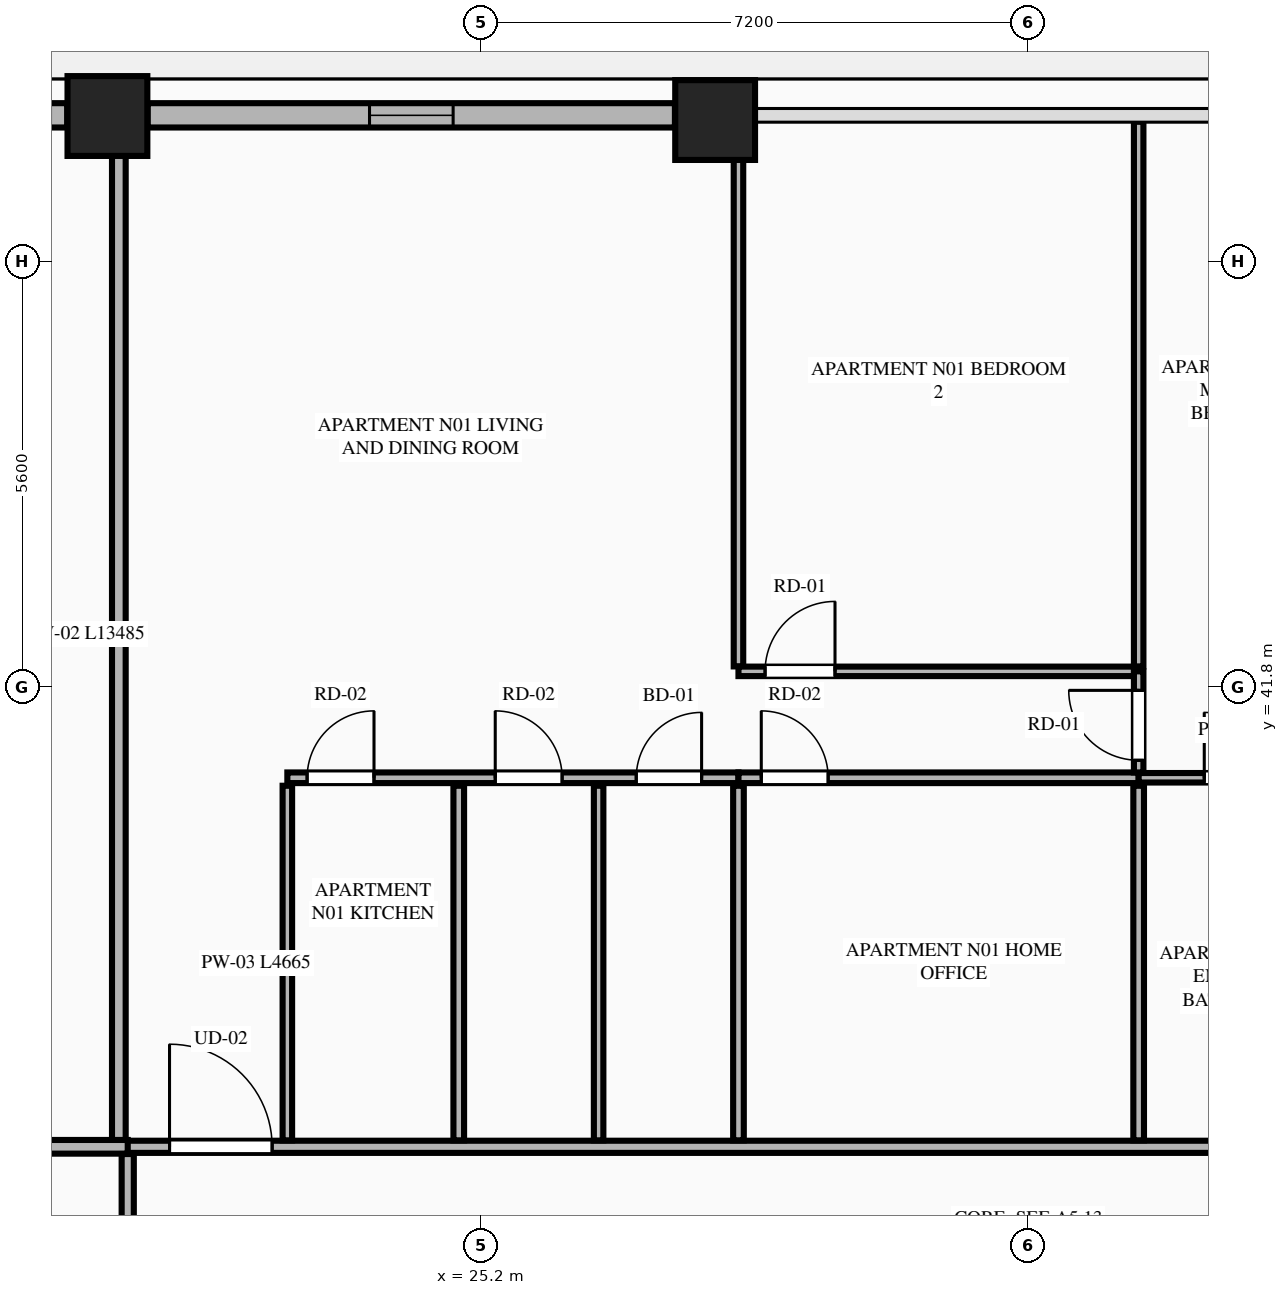
"""IFC4 building model, lengths in metres.
Left out: names, types, materials, properties, quantities, classifications, styles, units other than length and angle.
Written with IfcOpenShell. Run it as: python <this file> out.ifc"""

import sys

from ifc_helpers import new_model, si_unit, direction, frame, frame_2d, origin, origin_2d, place, context, subcontext, project, spatial, rectangle, extrude, element, fill, save


model = new_model("IFC4")
c1 = context("Model", 3, precision=1e-05, world=origin(), true_north=direction((0.0, 1.0)))
c2 = subcontext(c1, "Body", "Model", "MODEL_VIEW")
j1 = project(units=[si_unit("LENGTHUNIT", "METRE"), si_unit("PLANEANGLEUNIT", "RADIAN")], contexts=[c1])
p1 = place(None, origin())
s1 = spatial("IfcSite", under=j1, at=p1, CompositionType="ELEMENT")
p2 = place(p1, origin())
s2 = spatial("IfcBuilding", under=s1, at=p2, CompositionType="ELEMENT")
p3 = place(p2, frame((0.0, 0.0, 94.2)))
s3 = spatial("IfcBuildingStorey", under=s2, at=p3, CompositionType="ELEMENT", Elevation=94.2)
for number, where, z_axis, x_axis in (
    (1, (28.278, 49.258, 0.0), (0.0, 0.0, 1.0), (1.0, 0.0, 0.0)),
    (2, (20.283, 49.311, 0.0), (0.0, 0.0, 1.0), (1.0, 0.0, 0.0)),
):
    element("IfcColumn", number, at=place(p3, frame(where, z_axis=z_axis, x_axis=x_axis)), inside=s3, PredefinedType="COLUMN", context=c2, shape_type="SweptSolid", body=[
        extrude(rectangle(XDim=1.05, YDim=1.05, at=origin_2d()), origin(), (0.0, 0.0, 1.0), 4.2),
    ])
p4 = place(p3, frame((27.749, 49.32, 0.0), z_axis=(0.0, 0.0, 1.0), x_axis=(-1.0, 0.0, 0.0)))
e3 = element("IfcWall", 3, at=p4, inside=s3, PredefinedType="STANDARD", context=c2, shape_type="SweptSolid", body=[
    extrude(rectangle(XDim=6.937, YDim=0.32, at=frame_2d((3.469, 0.0))), origin(), (0.0, 0.0, 1.0), 2.59),
])
p5 = place(p4, frame((2.918, 0.0, 0.75)))
e4 = element("IfcOpeningElement", 4, at=p5, cuts=e3, PredefinedType="OPENING", context=c2, shape_type="SweptSolid", body=[
    extrude(rectangle(XDim=1.1, YDim=1.69, at=frame_2d((0.55, 0.845))), frame((0.0, 0.17, 0.0), z_axis=(0.0, -1.0, 0.0), x_axis=(1.0, 0.0, 0.0)), (0.0, 0.0, 1.0), 0.34),
])
p6 = place(p3, frame((19.754, 49.32, 0.0), z_axis=(0.0, 0.0, 1.0), x_axis=(-1.0, 0.0, 0.0)))
e5 = element("IfcWall", 5, at=p6, inside=s3, PredefinedType="STANDARD", context=c2, shape_type="SweptSolid", body=[
    extrude(rectangle(XDim=1.318, YDim=0.32, at=frame_2d((0.659, 0.0))), origin(), (0.0, 0.0, 1.0), 3.99),
])
p7 = place(p6, frame((0.22, 0.0, 0.75)))
e6 = element("IfcOpeningElement", 6, at=p7, cuts=e5, PredefinedType="OPENING", context=c2, shape_type="SweptSolid", body=[
    extrude(rectangle(XDim=0.878, YDim=1.7, at=frame_2d((0.439, 0.85))), frame((0.0, 0.17, 0.0), z_axis=(0.0, -1.0, 0.0), x_axis=(1.0, 0.0, 0.0)), (0.0, 0.0, 1.0), 0.34),
])
p8 = place(p3, frame((20.433, 35.75, 0.0), z_axis=(0.0, 0.0, 1.0), x_axis=(0.0, 1.0, 0.0)))
e7 = element("IfcWall", 7, at=p8, inside=s3, PredefinedType="PARTITIONING", context=c2, shape_type="SweptSolid", body=[
    extrude(rectangle(XDim=13.485, YDim=0.18, at=frame_2d((6.743, 0.0))), origin(), (0.0, 0.0, 1.0), 2.59),
])
p9 = place(p3, frame((20.528, 35.75, 0.0), z_axis=(0.0, 0.0, 1.0), x_axis=(1.0, 0.0, 0.0)))
e8 = element("IfcWall", 8, at=p9, inside=s3, PredefinedType="PARTITIONING", context=c2, shape_type="SweptSolid", body=[
    extrude(rectangle(XDim=15.899, YDim=0.16, at=frame_2d((7.949, 0.0))), origin(), (0.0, 0.0, 1.0), 3.99),
])
p10 = place(p9, frame((0.572, 0.0, 0.0)))
e9 = element("IfcOpeningElement", 9, at=p10, cuts=e8, PredefinedType="OPENING", context=c2, shape_type="SweptSolid", body=[
    extrude(rectangle(XDim=1.35, YDim=2.35, at=frame_2d((0.675, 1.175))), frame((0.0, 0.09, 0.0), z_axis=(0.0, -1.0, 0.0), x_axis=(1.0, 0.0, 0.0)), (0.0, 0.0, 1.0), 0.18),
])
p11 = place(p3, frame((22.65, 35.835, 0.0), z_axis=(0.0, 0.0, 1.0), x_axis=(0.0, 1.0, 0.0)))
e10 = element("IfcWall", 10, at=p11, inside=s3, PredefinedType="PARTITIONING", context=c2, shape_type="SweptSolid", body=[
    extrude(rectangle(XDim=4.665, YDim=0.125, at=frame_2d((2.333, 0.0))), origin(), (0.0, 0.0, 1.0), 2.59),
])
p12 = place(p3, frame((22.65, 40.605, 0.0), z_axis=(0.0, 0.0, 1.0), x_axis=(1.0, 0.0, 0.0)))
e11 = element("IfcWall", 11, at=p12, inside=s3, PredefinedType="PLUMBINGWALL", context=c2, shape_type="SweptSolid", body=[
    extrude(rectangle(XDim=5.935, YDim=0.14, at=frame_2d((2.968, 0.0))), origin(), (0.0, 0.0, 1.0), 3.99),
])
p13 = place(p12, frame((4.59, 0.0, 0.0)))
e12 = element("IfcOpeningElement", 12, at=p13, cuts=e11, PredefinedType="OPENING", context=c2, shape_type="SweptSolid", body=[
    extrude(rectangle(XDim=0.86, YDim=2.1, at=frame_2d((0.43, 1.05))), frame((0.0, 0.08, 0.0), z_axis=(0.0, -1.0, 0.0), x_axis=(1.0, 0.0, 0.0)), (0.0, 0.0, 1.0), 0.16),
])
p14 = place(p12, frame((0.26, 0.0, 0.0)))
e13 = element("IfcOpeningElement", 13, at=p14, cuts=e11, PredefinedType="OPENING", context=c2, shape_type="SweptSolid", body=[
    extrude(rectangle(XDim=0.88, YDim=2.15, at=frame_2d((0.44, 1.075))), frame((0.0, 0.08, 0.0), z_axis=(0.0, -1.0, 0.0), x_axis=(1.0, 0.0, 0.0)), (0.0, 0.0, 1.0), 0.16),
])
p15 = place(p12, frame((2.735, 0.0, 0.0)))
e14 = element("IfcOpeningElement", 14, at=p15, cuts=e11, PredefinedType="OPENING", context=c2, shape_type="SweptSolid", body=[
    extrude(rectangle(XDim=0.88, YDim=2.15, at=frame_2d((0.44, 1.075))), frame((0.0, 0.08, 0.0), z_axis=(0.0, -1.0, 0.0), x_axis=(1.0, 0.0, 0.0)), (0.0, 0.0, 1.0), 0.16),
])
p16 = place(p3, frame((28.585, 40.605, 0.0), z_axis=(0.0, 0.0, 1.0), x_axis=(1.0, 0.0, 0.0)))
e15 = element("IfcWall", 15, at=p16, inside=s3, PredefinedType="PLUMBINGWALL", context=c2, shape_type="SweptSolid", body=[
    extrude(rectangle(XDim=5.265, YDim=0.14, at=frame_2d((2.633, 0.0))), origin(), (0.0, 0.0, 1.0), 3.99),
])
p17 = place(p16, frame((0.3, 0.0, 0.0)))
e16 = element("IfcOpeningElement", 16, at=p17, cuts=e15, PredefinedType="OPENING", context=c2, shape_type="SweptSolid", body=[
    extrude(rectangle(XDim=0.88, YDim=2.15, at=frame_2d((0.44, 1.075))), frame((0.0, 0.08, 0.0), z_axis=(0.0, -1.0, 0.0), x_axis=(1.0, 0.0, 0.0)), (0.0, 0.0, 1.0), 0.16),
])
p18 = place(p3, frame((33.85, 40.605, 0.0), z_axis=(0.0, 0.0, 1.0), x_axis=(1.0, 0.0, 0.0)))
e17 = element("IfcWall", 17, at=p18, inside=s3, PredefinedType="PARTITIONING", context=c2, shape_type="SweptSolid", body=[
    extrude(rectangle(XDim=2.577, YDim=0.125, at=frame_2d((1.289, 0.0))), origin(), (0.0, 0.0, 1.0), 3.99),
])
p19 = place(p18, frame((0.863, 0.0, 0.0)))
e18 = element("IfcOpeningElement", 18, at=p19, cuts=e17, PredefinedType="OPENING", context=c2, shape_type="SweptSolid", body=[
    extrude(rectangle(XDim=0.86, YDim=2.1, at=frame_2d((0.43, 1.05))), frame((0.0, 0.073, 0.0), z_axis=(0.0, -1.0, 0.0), x_axis=(1.0, 0.0, 0.0)), (0.0, 0.0, 1.0), 0.145),
])
p20 = place(p3, frame((24.905, 35.835, 0.0), z_axis=(0.0, 0.0, 1.0), x_axis=(0.0, 1.0, 0.0)))
e19 = element("IfcWall", 19, at=p20, inside=s3, PredefinedType="PLUMBINGWALL", context=c2, shape_type="SweptSolid", body=[
    extrude(rectangle(XDim=4.665, YDim=0.14, at=frame_2d((2.333, 0.0))), origin(), (0.0, 0.0, 1.0), 3.99),
])
p21 = place(p3, frame((26.745, 35.835, 0.0), z_axis=(0.0, 0.0, 1.0), x_axis=(0.0, 1.0, 0.0)))
e20 = element("IfcWall", 20, at=p21, inside=s3, PredefinedType="PARTITIONING", context=c2, shape_type="SweptSolid", body=[
    extrude(rectangle(XDim=4.665, YDim=0.125, at=frame_2d((2.333, 0.0))), origin(), (0.0, 0.0, 1.0), 3.99),
])
p22 = place(p3, frame((28.585, 42.07, 0.0), z_axis=(0.0, 0.0, 1.0), x_axis=(0.0, 1.0, 0.0)))
e21 = element("IfcWall", 21, at=p22, inside=s3, PredefinedType="PARTITIONING", context=c2, shape_type="SweptSolid", body=[
    extrude(rectangle(XDim=7.165, YDim=0.125, at=frame_2d((3.583, 0.0))), origin(), (0.0, 0.0, 1.0), 2.59),
])
p23 = place(p3, frame((28.585, 42.005, 0.0), z_axis=(0.0, 0.0, 1.0), x_axis=(1.0, 0.0, 0.0)))
e22 = element("IfcWall", 22, at=p23, inside=s3, PredefinedType="PARTITIONING", context=c2, shape_type="SweptSolid", body=[
    extrude(rectangle(XDim=5.265, YDim=0.125, at=frame_2d((2.633, 0.0))), origin(), (0.0, 0.0, 1.0), 3.99),
])
p24 = place(p23, frame((0.35, 0.0, 0.0)))
e23 = element("IfcOpeningElement", 23, at=p24, cuts=e22, PredefinedType="OPENING", context=c2, shape_type="SweptSolid", body=[
    extrude(rectangle(XDim=0.92, YDim=2.15, at=frame_2d((0.46, 1.075))), frame((0.0, 0.073, 0.0), z_axis=(0.0, -1.0, 0.0), x_axis=(1.0, 0.0, 0.0)), (0.0, 0.0, 1.0), 0.145),
])
p25 = place(p3, frame((33.85, 40.675, 0.0), z_axis=(0.0, 0.0, 1.0), x_axis=(0.0, 1.0, 0.0)))
e24 = element("IfcWall", 24, at=p25, inside=s3, PredefinedType="PARTITIONING", context=c2, shape_type="SweptSolid", body=[
    extrude(rectangle(XDim=1.33, YDim=0.125, at=frame_2d((0.665, 0.0))), origin(), (0.0, 0.0, 1.0), 3.99),
])
p26 = place(p25, frame((0.16, 0.0, 0.0)))
e25 = element("IfcOpeningElement", 25, at=p26, cuts=e24, PredefinedType="OPENING", context=c2, shape_type="SweptSolid", body=[
    extrude(rectangle(XDim=0.92, YDim=2.15, at=frame_2d((0.46, 1.075))), frame((0.0, 0.073, 0.0), z_axis=(0.0, -1.0, 0.0), x_axis=(1.0, 0.0, 0.0)), (0.0, 0.0, 1.0), 0.145),
])
p27 = place(p3, frame((28.585, 35.835, 0.0), z_axis=(0.0, 0.0, 1.0), x_axis=(0.0, 1.0, 0.0)))
e26 = element("IfcWall", 26, at=p27, inside=s3, PredefinedType="PLUMBINGWALL", context=c2, shape_type="SweptSolid", body=[
    extrude(rectangle(XDim=4.665, YDim=0.14, at=frame_2d((2.333, 0.0))), origin(), (0.0, 0.0, 1.0), 2.59),
])
p28 = place(p3, frame((33.85, 35.835, 0.0), z_axis=(0.0, 0.0, 1.0), x_axis=(0.0, 1.0, 0.0)))
e27 = element("IfcWall", 27, at=p28, inside=s3, PredefinedType="PLUMBINGWALL", context=c2, shape_type="SweptSolid", body=[
    extrude(rectangle(XDim=4.665, YDim=0.14, at=frame_2d((2.333, 0.0))), origin(), (0.0, 0.0, 1.0), 3.99),
])
p29 = place(p3, frame((33.85, 42.07, 0.0), z_axis=(0.0, 0.0, 1.0), x_axis=(0.0, 1.0, 0.0)))
e28 = element("IfcWall", 28, at=p29, inside=s3, PredefinedType="PARTITIONING", context=c2, shape_type="SweptSolid", body=[
    extrude(rectangle(XDim=7.165, YDim=0.125, at=frame_2d((3.583, 0.0))), origin(), (0.0, 0.0, 1.0), 3.99),
])
p30 = place(p3, frame((10.603, 35.75, 0.0), z_axis=(0.0, 0.0, 1.0), x_axis=(1.0, 0.0, 0.0)))
e29 = element("IfcWall", 29, at=p30, inside=s3, PredefinedType="PARTITIONING", context=c2, shape_type="SweptSolid", body=[
    extrude(rectangle(XDim=9.947, YDim=0.18, at=frame_2d((4.974, 0.0))), origin(), (0.0, 0.0, 1.0), 3.99),
])
p31 = place(p3, frame((20.55, 16.295, 0.0), z_axis=(0.0, 0.0, 1.0), x_axis=(0.0, 1.0, 0.0)))
e30 = element("IfcWall", 30, at=p31, inside=s3, PredefinedType="PARTITIONING", context=c2, shape_type="SweptSolid", body=[
    extrude(rectangle(XDim=19.36, YDim=0.16, at=frame_2d((9.68, 0.0))), origin(), (0.0, 0.0, 1.0), 2.59),
])
p32 = place(p31, frame((0.45, 0.0, 0.0)))
e31 = element("IfcOpeningElement", 31, at=p32, cuts=e30, PredefinedType="OPENING", context=c2, shape_type="SweptSolid", body=[
    extrude(rectangle(XDim=1.02, YDim=2.25, at=frame_2d((0.51, 1.125))), frame((0.0, 0.09, 0.0), z_axis=(0.0, -1.0, 0.0), x_axis=(1.0, 0.0, 0.0)), (0.0, 0.0, 1.0), 0.18),
])
p33 = place(p5, origin())
e32 = element("IfcWindow", 32, at=p33, inside=s3, PartitioningType="SINGLE_PANEL", PredefinedType="WINDOW", context=c2, shape_type="SweptSolid", body=[
    extrude(rectangle(XDim=1.1, YDim=1.69, at=frame_2d((0.55, 0.845))), frame((0.0, 0.03, 0.0), z_axis=(0.0, -1.0, 0.0), x_axis=(1.0, 0.0, 0.0)), (0.0, 0.0, 1.0), 0.06),
])
fill(e4, e32)
p34 = place(p13, origin())
e33 = element("IfcDoor", 33, at=p34, inside=s3, OperationType="SINGLE_SWING_RIGHT", PredefinedType="DOOR", context=c2, shape_type="SweptSolid", body=[
    extrude(rectangle(XDim=0.86, YDim=2.1, at=frame_2d((0.43, 1.05))), frame((0.0, 0.025, 0.0), z_axis=(0.0, -1.0, 0.0), x_axis=(1.0, 0.0, 0.0)), (0.0, 0.0, 1.0), 0.05),
])
fill(e12, e33)
p35 = place(p19, origin())
e34 = element("IfcDoor", 34, at=p35, inside=s3, OperationType="SINGLE_SWING_LEFT", PredefinedType="DOOR", context=c2, shape_type="SweptSolid", body=[
    extrude(rectangle(XDim=0.86, YDim=2.1, at=frame_2d((0.43, 1.05))), frame((0.0, 0.025, 0.0), z_axis=(0.0, -1.0, 0.0), x_axis=(1.0, 0.0, 0.0)), (0.0, 0.0, 1.0), 0.05),
])
fill(e18, e34)
p36 = place(p10, origin())
e35 = element("IfcDoor", 35, at=p36, inside=s3, OperationType="SINGLE_SWING_LEFT", PredefinedType="DOOR", context=c2, shape_type="SweptSolid", body=[
    extrude(rectangle(XDim=1.35, YDim=2.35, at=frame_2d((0.675, 1.175))), frame((0.0, 0.025, 0.0), z_axis=(0.0, -1.0, 0.0), x_axis=(1.0, 0.0, 0.0)), (0.0, 0.0, 1.0), 0.05),
])
fill(e9, e35)
p37 = place(p14, origin())
e36 = element("IfcDoor", 36, at=p37, inside=s3, OperationType="SINGLE_SWING_RIGHT", PredefinedType="DOOR", context=c2, shape_type="SweptSolid", body=[
    extrude(rectangle(XDim=0.88, YDim=2.15, at=frame_2d((0.44, 1.075))), frame((0.0, 0.025, 0.0), z_axis=(0.0, -1.0, 0.0), x_axis=(1.0, 0.0, 0.0)), (0.0, 0.0, 1.0), 0.05),
])
fill(e13, e36)
p38 = place(p15, origin())
e37 = element("IfcDoor", 37, at=p38, inside=s3, OperationType="SINGLE_SWING_LEFT", PredefinedType="DOOR", context=c2, shape_type="SweptSolid", body=[
    extrude(rectangle(XDim=0.88, YDim=2.15, at=frame_2d((0.44, 1.075))), frame((0.0, 0.025, 0.0), z_axis=(0.0, -1.0, 0.0), x_axis=(1.0, 0.0, 0.0)), (0.0, 0.0, 1.0), 0.05),
])
fill(e14, e37)
p39 = place(p17, origin())
e38 = element("IfcDoor", 38, at=p39, inside=s3, OperationType="SINGLE_SWING_LEFT", PredefinedType="DOOR", context=c2, shape_type="SweptSolid", body=[
    extrude(rectangle(XDim=0.88, YDim=2.15, at=frame_2d((0.44, 1.075))), frame((0.0, 0.025, 0.0), z_axis=(0.0, -1.0, 0.0), x_axis=(1.0, 0.0, 0.0)), (0.0, 0.0, 1.0), 0.05),
])
fill(e16, e38)
p40 = place(p24, origin())
e39 = element("IfcDoor", 39, at=p40, inside=s3, OperationType="SINGLE_SWING_RIGHT", PredefinedType="DOOR", context=c2, shape_type="SweptSolid", body=[
    extrude(rectangle(XDim=0.92, YDim=2.15, at=frame_2d((0.46, 1.075))), frame((0.0, 0.025, 0.0), z_axis=(0.0, -1.0, 0.0), x_axis=(1.0, 0.0, 0.0)), (0.0, 0.0, 1.0), 0.05),
])
fill(e23, e39)
p41 = place(p26, origin())
e40 = element("IfcDoor", 40, at=p41, inside=s3, OperationType="SINGLE_SWING_RIGHT", PredefinedType="DOOR", context=c2, shape_type="SweptSolid", body=[
    extrude(rectangle(XDim=0.92, YDim=2.15, at=frame_2d((0.46, 1.075))), frame((0.0, 0.025, 0.0), z_axis=(0.0, -1.0, 0.0), x_axis=(1.0, 0.0, 0.0)), (0.0, 0.0, 1.0), 0.05),
])
fill(e25, e40)
save(model, sys.argv[1])
